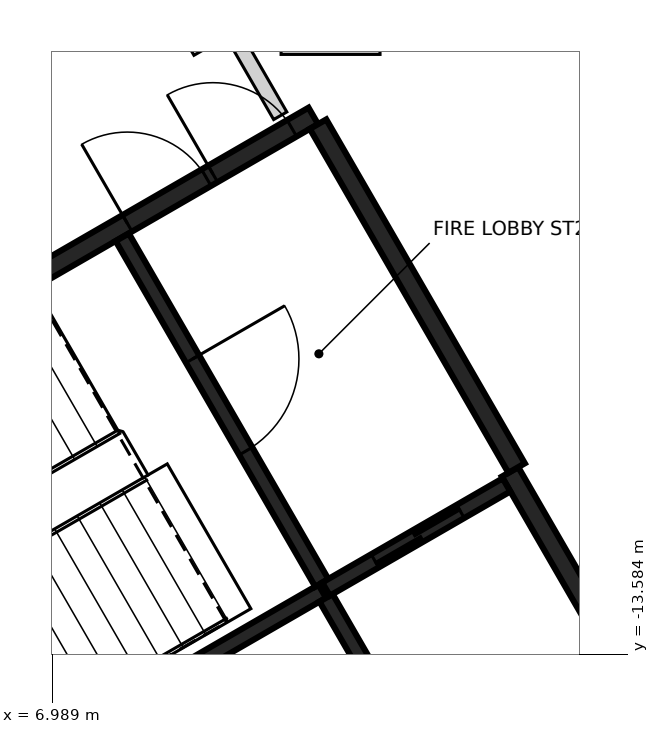
"""IFC4 building model, lengths in metres.
Left out: names, types, materials, properties, quantities, classifications, styles, units other than length and angle.
Written with IfcOpenShell. Run it as: python <this file> out.ifc"""

import sys

from ifc_helpers import new_model, si_unit, direction, frame, frame_2d, origin, place, context, subcontext, project, spatial, rectangle, extrude, element, fill, save


model = new_model("IFC4")
c1 = context("Model", 3, precision=1e-05, world=origin(), true_north=direction((0.0, 1.0)))
c2 = subcontext(c1, "Body", "Model", "MODEL_VIEW")
j1 = project(units=[si_unit("LENGTHUNIT", "METRE"), si_unit("PLANEANGLEUNIT", "RADIAN")], contexts=[c1])
p1 = place(None, origin())
s1 = spatial("IfcSite", under=j1, at=p1, CompositionType="ELEMENT")
p2 = place(p1, origin())
s2 = spatial("IfcBuilding", under=s1, at=p2, CompositionType="ELEMENT")
p3 = place(p2, frame((0.0, 0.0, 132.4)))
s3 = spatial("IfcBuildingStorey", under=s2, at=p3, CompositionType="ELEMENT", Elevation=132.4)
p4 = place(p3, frame((0.417, -12.273, 0.0), z_axis=(0.0, 0.0, 1.0), x_axis=(0.866021906294, 0.500006057782, 0.0)))
e1 = element("IfcWall", 1, at=p4, inside=s3, PredefinedType="SHEAR", context=c2, shape_type="SweptSolid", body=[
    extrude(rectangle(XDim=11.55, YDim=0.25, at=frame_2d((5.775, 0.0))), origin(), (0.0, 0.0, 1.0), 3.2),
])
p5 = place(p4, frame((10.025, 0.0, 0.0)))
e2 = element("IfcOpeningElement", 2, at=p5, cuts=e1, PredefinedType="OPENING", context=c2, shape_type="SweptSolid", body=[
    extrude(rectangle(XDim=1.2, YDim=2.1, at=frame_2d((0.6, 1.05))), frame((0.0, 0.135, 0.0), z_axis=(0.0, -1.0, 0.0), x_axis=(1.0, 0.0, 0.0)), (0.0, 0.0, 1.0), 0.27),
])
p6 = place(p4, frame((8.725, 0.0, 0.0)))
e3 = element("IfcOpeningElement", 3, at=p6, cuts=e1, PredefinedType="OPENING", context=c2, shape_type="SweptSolid", body=[
    extrude(rectangle(XDim=1.2, YDim=2.1, at=frame_2d((0.6, 1.05))), frame((0.0, 0.135, 0.0), z_axis=(0.0, -1.0, 0.0), x_axis=(1.0, 0.0, 0.0)), (0.0, 0.0, 1.0), 0.27),
])
p7 = place(p3, frame((13.008, -11.181, 0.0), z_axis=(0.0, 0.0, 1.0), x_axis=(0.500004234368, -0.866022959057, 0.0)))
e4 = element("IfcWall", 4, at=p7, inside=s3, PredefinedType="SHEAR", context=c2, shape_type="SweptSolid", body=[
    extrude(rectangle(XDim=6.25, YDim=0.25, at=frame_2d((3.125, 0.0))), origin(), (0.0, 0.0, 1.0), 3.2),
])
p8 = place(p3, frame((10.483, -6.606, 0.0), z_axis=(0.0, 0.0, 1.0), x_axis=(0.49999885962, -0.866026062182, 0.0)))
e5 = element("IfcWall", 5, at=p8, inside=s3, PredefinedType="SHEAR", context=c2, shape_type="SweptSolid", body=[
    extrude(rectangle(XDim=5.225, YDim=0.25, at=frame_2d((2.612, 0.0))), origin(), (0.0, 0.0, 1.0), 3.2),
])
p9 = place(p3, frame((10.538, -12.752, 0.0), z_axis=(0.0, 0.0, 1.0), x_axis=(-0.866038630372, -0.499977090179, 0.0)))
e6 = element("IfcWall", 6, at=p9, inside=s3, PredefinedType="SHEAR", context=c2, shape_type="SweptSolid", body=[
    extrude(rectangle(XDim=5.699, YDim=0.2, at=frame_2d((2.85, 0.0))), origin(), (0.0, 0.0, 1.0), 3.2),
])
p10 = place(p3, frame((7.906, -8.094, 0.0), z_axis=(0.0, 0.0, 1.0), x_axis=(0.500024287448, -0.866011380966, 0.0)))
e7 = element("IfcWall", 7, at=p10, inside=s3, PredefinedType="SHEAR", context=c2, shape_type="SweptSolid", body=[
    extrude(rectangle(XDim=5.251, YDim=0.2, at=frame_2d((2.625, 0.0))), origin(), (0.0, 0.0, 1.0), 3.2),
])
p11 = place(p10, frame((1.849, 0.0, 0.0)))
e8 = element("IfcOpeningElement", 8, at=p11, cuts=e7, PredefinedType="OPENING", context=c2, shape_type="SweptSolid", body=[
    extrude(rectangle(XDim=1.4, YDim=2.1, at=frame_2d((0.7, 1.05))), frame((0.0, 0.11, 0.0), z_axis=(0.0, -1.0, 0.0), x_axis=(1.0, 0.0, 0.0)), (0.0, 0.0, 1.0), 0.22),
])
p12 = place(p3, frame((11.963, -15.22, 0.0), z_axis=(0.0, 0.0, 1.0), x_axis=(-0.500034990121, 0.866005201286, 0.0)))
e9 = element("IfcWall", 9, at=p12, inside=s3, PredefinedType="SHEAR", context=c2, shape_type="SweptSolid", body=[
    extrude(rectangle(XDim=2.75, YDim=0.2, at=frame_2d((1.375, 0.0))), origin(), (0.0, 0.0, 1.0), 3.2),
])
p13 = place(p3, frame((10.587, -12.723, 0.0), z_axis=(0.0, 0.0, 1.0), x_axis=(0.866037306777, 0.499979382845, 0.0)))
e10 = element("IfcWall", 10, at=p13, inside=s3, PredefinedType="SHEAR", context=c2, shape_type="SweptSolid", body=[
    extrude(rectangle(XDim=2.742, YDim=0.2, at=frame_2d((1.371, 0.0))), origin(), (0.0, 0.0, 1.0), 3.2),
])
p14 = place(p13, frame((0.743, 0.0, 0.0)))
e11 = element("IfcOpeningElement", 11, at=p14, cuts=e10, PredefinedType="OPENING", context=c2, shape_type="SweptSolid", body=[
    extrude(rectangle(XDim=1.3, YDim=2.1, at=frame_2d((0.65, 1.05))), frame((0.0, 0.11, 0.0), z_axis=(0.0, -1.0, 0.0), x_axis=(1.0, 0.0, 0.0)), (0.0, 0.0, 1.0), 0.22),
])
p15 = place(p3, frame((8.8, -5.614, 0.0), z_axis=(0.0, 0.0, 1.0), x_axis=(0.866491166515, 0.499192406143, 0.0)))
e12 = element("IfcWall", 12, at=p15, inside=s3, PredefinedType="PARTITIONING", context=c2, shape_type="SweptSolid", body=[
    extrude(rectangle(XDim=0.585, YDim=0.2, at=frame_2d((0.292, 0.0))), origin(), (0.0, 0.0, 1.0), 3.2),
])
p16 = place(p3, frame((9.308, -5.322, 0.0), z_axis=(0.0, 0.0, 1.0), x_axis=(0.499644515495, -0.866230545603, 0.0)))
e13 = element("IfcWall", 13, at=p16, inside=s3, PredefinedType="PARTITIONING", context=c2, shape_type="SweptSolid", body=[
    extrude(rectangle(XDim=1.356, YDim=0.2, at=frame_2d((0.678, 0.0))), origin(), (0.0, 0.0, 1.0), 3.2),
])
p17 = place(p3, frame((11.298, -5.614, 0.0), z_axis=(0.0, 0.0, 1.0), x_axis=(-1.0, 0.0, 0.0)))
e14 = element("IfcWall", 14, at=p17, inside=s3, PredefinedType="PARTITIONING", context=c2, shape_type="SweptSolid", body=[
    extrude(rectangle(XDim=1.302, YDim=0.15, at=frame_2d((0.651, 0.0))), origin(), (0.0, 0.0, 1.0), 3.2),
])
p18 = place(p14, origin())
e15 = element("IfcDoor", 15, at=p18, inside=s3, OperationType="SLIDING_TO_LEFT", PredefinedType="DOOR", context=c2, shape_type="SweptSolid", body=[
    extrude(rectangle(XDim=1.3, YDim=2.1, at=frame_2d((0.65, 1.05))), frame((0.0, 0.025, 0.0), z_axis=(0.0, -1.0, 0.0), x_axis=(1.0, 0.0, 0.0)), (0.0, 0.0, 1.0), 0.05),
])
fill(e11, e15)
p19 = place(p5, origin())
e16 = element("IfcDoor", 16, at=p19, inside=s3, OperationType="SINGLE_SWING_LEFT", PredefinedType="DOOR", context=c2, shape_type="SweptSolid", body=[
    extrude(rectangle(XDim=1.2, YDim=2.1, at=frame_2d((0.6, 1.05))), frame((0.0, 0.025, 0.0), z_axis=(0.0, -1.0, 0.0), x_axis=(1.0, 0.0, 0.0)), (0.0, 0.0, 1.0), 0.05),
])
fill(e2, e16)
p20 = place(p6, origin())
e17 = element("IfcDoor", 17, at=p20, inside=s3, OperationType="SINGLE_SWING_RIGHT", PredefinedType="DOOR", context=c2, shape_type="SweptSolid", body=[
    extrude(rectangle(XDim=1.2, YDim=2.1, at=frame_2d((0.6, 1.05))), frame((0.0, 0.025, 0.0), z_axis=(0.0, -1.0, 0.0), x_axis=(1.0, 0.0, 0.0)), (0.0, 0.0, 1.0), 0.05),
])
fill(e3, e17)
p21 = place(p11, origin())
e18 = element("IfcDoor", 18, at=p21, inside=s3, OperationType="SINGLE_SWING_LEFT", PredefinedType="DOOR", context=c2, shape_type="SweptSolid", body=[
    extrude(rectangle(XDim=1.4, YDim=2.1, at=frame_2d((0.7, 1.05))), frame((0.0, 0.025, 0.0), z_axis=(0.0, -1.0, 0.0), x_axis=(1.0, 0.0, 0.0)), (0.0, 0.0, 1.0), 0.05),
])
fill(e8, e18)
save(model, sys.argv[1])
